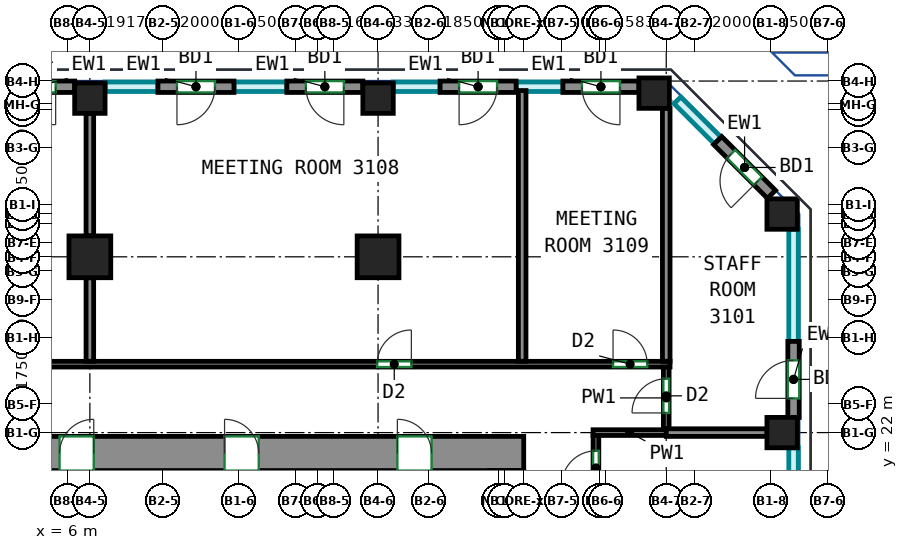
"""IFC4 building model, lengths in metres.
Left out: names, types, materials, properties, quantities, classifications, styles, units other than length and angle.
Written with IfcOpenShell. Run it as: python <this file> out.ifc"""

import sys

from ifc_helpers import new_model, si_unit, direction, frame, frame_2d, origin, origin_2d, place, context, subcontext, project, spatial, rectangle, extrude, source, transform, mapped, element, fill, save


model = new_model("IFC4")
c1 = context("Model", 3, precision=1e-05, world=origin(), true_north=direction((0.0, 1.0)))
c2 = subcontext(c1, "Body", "Model", "MODEL_VIEW")
j1 = project(units=[si_unit("LENGTHUNIT", "METRE"), si_unit("PLANEANGLEUNIT", "RADIAN")], contexts=[c1])
p1 = place(None, origin())
s1 = spatial("IfcSite", under=j1, at=p1, CompositionType="ELEMENT")
p2 = place(p1, origin())
s2 = spatial("IfcBuilding", under=s1, at=p2, CompositionType="ELEMENT")
p3 = place(p2, frame((0.0, 0.0, 138.5)))
s3 = spatial("IfcBuildingStorey", under=s2, at=p3, CompositionType="ELEMENT", Elevation=138.5)
m1 = source(origin(), c2, "Body", "SweptSolid", [
    extrude(rectangle(XDim=1.1, YDim=1.1, at=origin_2d()), origin(), (0.0, 0.0, 1.0), 5.12),
])
p4 = place(p3, frame((6.583, 26.625, 0.0), z_axis=(0.0, 0.0, 1.0), x_axis=(1.0, 0.0, 0.0)))
e1 = element("IfcColumn", 1, at=p4, inside=s3, PredefinedType="COLUMN", context=c2, shape_type="MappedRepresentation", body=[
    mapped(m1, transform((0.0, 0.0, 0.0))),
])
m2 = source(origin(), c2, "Body", "SweptSolid", [
    extrude(rectangle(XDim=0.8, YDim=0.8, at=origin_2d()), origin(), (0.0, 0.0, 1.0), 5.12),
])
p5 = place(p3, frame((6.583, 30.8, 0.0), z_axis=(0.0, 0.0, 1.0), x_axis=(1.0, 0.0, 0.0)))
e2 = element("IfcColumn", 2, at=p5, inside=s3, PredefinedType="COLUMN", context=c2, shape_type="MappedRepresentation", body=[
    mapped(m2, transform((0.0, 0.0, 0.0))),
])
p6 = place(p3, frame((14.167, 26.625, 0.0), z_axis=(0.0, 0.0, 1.0), x_axis=(1.0, 0.0, 0.0)))
e3 = element("IfcColumn", 3, at=p6, inside=s3, PredefinedType="COLUMN", context=c2, shape_type="MappedRepresentation", body=[
    mapped(m1, transform((0.0, 0.0, 0.0))),
])
for number, where, z_axis, x_axis in (
    (4, (14.167, 30.8, 0.0), (0.0, 0.0, 1.0), (1.0, 0.0, 0.0)),
    (5, (21.432, 30.932, 0.0), (0.0, 0.0, 1.0), (1.0, 0.0, 0.0)),
    (6, (24.8, 22.0, 0.0), (0.0, 0.0, 1.0), (1.0, 0.0, 0.0)),
    (7, (24.8, 27.75, 0.0), (0.0, 0.0, 1.0), (1.0, 0.0, 0.0)),
):
    element("IfcColumn", number, at=place(p3, frame(where, z_axis=z_axis, x_axis=x_axis)), inside=s3, PredefinedType="COLUMN", context=c2, shape_type="MappedRepresentation", body=[
        mapped(m2, transform((0.0, 0.0, 0.0))),
    ])
m3 = source(origin(), c2, "Body", "SweptSolid", [
    extrude(rectangle(XDim=33.9, YDim=0.9, at=frame_2d((16.95, 0.0))), origin(), (0.0, 0.0, 1.0), 5.12),
])
p7 = place(p3, frame((-15.9, 21.45, 0.0), z_axis=(0.0, 0.0, 1.0), x_axis=(1.0, 0.0, 0.0)))
e8 = element("IfcWall", 8, at=p7, inside=s3, PredefinedType="SHEAR", context=c2, shape_type="MappedRepresentation", body=[
    mapped(m3, transform((0.0, 0.0, 0.0))),
])
p8 = place(p7, frame((7.12, 0.0, 0.0)))
e9 = element("IfcOpeningElement", 9, at=p8, cuts=e8, PredefinedType="OPENING", context=c2, shape_type="SweptSolid", body=[
    extrude(rectangle(XDim=0.9, YDim=2.1, at=frame_2d((0.45, 1.05))), frame((0.0, 0.46, 0.0), z_axis=(0.0, -1.0, 0.0), x_axis=(1.0, 0.0, 0.0)), (0.0, 0.0, 1.0), 0.92),
])
p9 = place(p7, frame((12.427, 0.0, 0.0)))
e10 = element("IfcOpeningElement", 10, at=p9, cuts=e8, PredefinedType="OPENING", context=c2, shape_type="SweptSolid", body=[
    extrude(rectangle(XDim=0.9, YDim=2.1, at=frame_2d((0.45, 1.05))), frame((0.0, 0.46, 0.0), z_axis=(0.0, -1.0, 0.0), x_axis=(1.0, 0.0, 0.0)), (0.0, 0.0, 1.0), 0.92),
])
p10 = place(p7, frame((17.465, 0.0, 0.0)))
e11 = element("IfcOpeningElement", 11, at=p10, cuts=e8, PredefinedType="OPENING", context=c2, shape_type="SweptSolid", body=[
    extrude(rectangle(XDim=0.9, YDim=2.1, at=frame_2d((0.45, 1.05))), frame((0.0, 0.46, 0.0), z_axis=(0.0, -1.0, 0.0), x_axis=(1.0, 0.0, 0.0)), (0.0, 0.0, 1.0), 0.92),
])
p11 = place(p7, frame((21.686, 0.0, 0.0)))
e12 = element("IfcOpeningElement", 12, at=p11, cuts=e8, PredefinedType="OPENING", context=c2, shape_type="SweptSolid", body=[
    extrude(rectangle(XDim=0.9, YDim=2.1, at=frame_2d((0.45, 1.05))), frame((0.0, 0.46, 0.0), z_axis=(0.0, -1.0, 0.0), x_axis=(1.0, 0.0, 0.0)), (0.0, 0.0, 1.0), 0.92),
])
p12 = place(p7, frame((26.027, 0.0, 0.0)))
e13 = element("IfcOpeningElement", 13, at=p12, cuts=e8, PredefinedType="OPENING", context=c2, shape_type="SweptSolid", body=[
    extrude(rectangle(XDim=0.9, YDim=2.1, at=frame_2d((0.45, 1.05))), frame((0.0, 0.46, 0.0), z_axis=(0.0, -1.0, 0.0), x_axis=(1.0, 0.0, 0.0)), (0.0, 0.0, 1.0), 0.92),
])
p13 = place(p7, frame((2.425, 0.0, 0.0)))
e14 = element("IfcOpeningElement", 14, at=p13, cuts=e8, PredefinedType="OPENING", context=c2, shape_type="SweptSolid", body=[
    extrude(rectangle(XDim=0.9, YDim=2.1, at=frame_2d((0.45, 1.05))), frame((0.0, 0.46, 0.0), z_axis=(0.0, -1.0, 0.0), x_axis=(1.0, 0.0, 0.0)), (0.0, 0.0, 1.0), 0.92),
])
p14 = place(p7, frame((30.575, 0.0, 0.0)))
e15 = element("IfcOpeningElement", 15, at=p14, cuts=e8, PredefinedType="OPENING", context=c2, shape_type="SweptSolid", body=[
    extrude(rectangle(XDim=0.9, YDim=2.1, at=frame_2d((0.45, 1.05))), frame((0.0, 0.46, 0.0), z_axis=(0.0, -1.0, 0.0), x_axis=(1.0, 0.0, 0.0)), (0.0, 0.0, 1.0), 0.92),
])
m4 = source(origin(), c2, "Body", "SweptSolid", [
    extrude(rectangle(XDim=2.0, YDim=0.3, at=frame_2d((1.0, 0.0))), origin(), (0.0, 0.0, 1.0), 5.12),
])
p15 = place(p3, frame((25.1, 22.4, 0.0), z_axis=(0.0, 0.0, 1.0), x_axis=(0.0, 1.0, 0.0)))
e16 = element("IfcWall", 16, at=p15, inside=s3, PredefinedType="SOLIDWALL", context=c2, shape_type="MappedRepresentation", body=[
    mapped(m4, transform((0.0, 0.0, 0.0))),
])
p16 = place(p15, frame((0.5, 0.0, 0.0)))
e17 = element("IfcOpeningElement", 17, at=p16, cuts=e16, PredefinedType="OPENING", context=c2, shape_type="SweptSolid", body=[
    extrude(rectangle(XDim=1.0, YDim=2.1, at=frame_2d((0.5, 1.05))), frame((0.0, 0.16, 0.0), z_axis=(0.0, -1.0, 0.0), x_axis=(1.0, 0.0, 0.0)), (0.0, 0.0, 1.0), 0.32),
])
p17 = place(p3, frame((24.519, 28.269, 0.0), z_axis=(0.0, 0.0, 1.0), x_axis=(-0.707045742145, 0.70716781496, 0.0)))
e18 = element("IfcWall", 18, at=p17, inside=s3, PredefinedType="SOLIDWALL", context=c2, shape_type="MappedRepresentation", body=[
    mapped(m4, transform((0.0, 0.0, 0.0))),
])
p18 = place(p17, frame((0.5, 0.0, 0.0)))
e19 = element("IfcOpeningElement", 19, at=p18, cuts=e18, PredefinedType="OPENING", context=c2, shape_type="SweptSolid", body=[
    extrude(rectangle(XDim=1.0, YDim=2.1, at=frame_2d((0.5, 1.05))), frame((0.0, 0.16, 0.0), z_axis=(0.0, -1.0, 0.0), x_axis=(1.0, 0.0, 0.0)), (0.0, 0.0, 1.0), 0.32),
])
p19 = place(p3, frame((21.032, 31.1, 0.0), z_axis=(0.0, 0.0, 1.0), x_axis=(-1.0, 0.0, 0.0)))
e20 = element("IfcWall", 20, at=p19, inside=s3, PredefinedType="SOLIDWALL", context=c2, shape_type="MappedRepresentation", body=[
    mapped(m4, transform((0.0, 0.0, 0.0))),
])
p20 = place(p19, frame((0.5, 0.0, 0.0)))
e21 = element("IfcOpeningElement", 21, at=p20, cuts=e20, PredefinedType="OPENING", context=c2, shape_type="SweptSolid", body=[
    extrude(rectangle(XDim=1.0, YDim=2.1, at=frame_2d((0.5, 1.05))), frame((0.0, 0.16, 0.0), z_axis=(0.0, -1.0, 0.0), x_axis=(1.0, 0.0, 0.0)), (0.0, 0.0, 1.0), 0.32),
])
p21 = place(p3, frame((17.799, 31.1, 0.0), z_axis=(0.0, 0.0, 1.0), x_axis=(-1.0, 0.0, 0.0)))
e22 = element("IfcWall", 22, at=p21, inside=s3, PredefinedType="SOLIDWALL", context=c2, shape_type="MappedRepresentation", body=[
    mapped(m4, transform((0.0, 0.0, 0.0))),
])
p22 = place(p21, frame((0.5, 0.0, 0.0)))
e23 = element("IfcOpeningElement", 23, at=p22, cuts=e22, PredefinedType="OPENING", context=c2, shape_type="SweptSolid", body=[
    extrude(rectangle(XDim=1.0, YDim=2.1, at=frame_2d((0.5, 1.05))), frame((0.0, 0.16, 0.0), z_axis=(0.0, -1.0, 0.0), x_axis=(1.0, 0.0, 0.0)), (0.0, 0.0, 1.0), 0.32),
])
p23 = place(p3, frame((13.767, 31.1, 0.0), z_axis=(0.0, 0.0, 1.0), x_axis=(-1.0, 0.0, 0.0)))
e24 = element("IfcWall", 24, at=p23, inside=s3, PredefinedType="SOLIDWALL", context=c2, shape_type="MappedRepresentation", body=[
    mapped(m4, transform((0.0, 0.0, 0.0))),
])
p24 = place(p23, frame((0.5, 0.0, 0.0)))
e25 = element("IfcOpeningElement", 25, at=p24, cuts=e24, PredefinedType="OPENING", context=c2, shape_type="SweptSolid", body=[
    extrude(rectangle(XDim=1.0, YDim=2.1, at=frame_2d((0.5, 1.05))), frame((0.0, 0.16, 0.0), z_axis=(0.0, -1.0, 0.0), x_axis=(1.0, 0.0, 0.0)), (0.0, 0.0, 1.0), 0.32),
])
p25 = place(p3, frame((10.375, 31.1, 0.0), z_axis=(0.0, 0.0, 1.0), x_axis=(-1.0, 0.0, 0.0)))
e26 = element("IfcWall", 26, at=p25, inside=s3, PredefinedType="SOLIDWALL", context=c2, shape_type="MappedRepresentation", body=[
    mapped(m4, transform((0.0, 0.0, 0.0))),
])
p26 = place(p25, frame((0.5, 0.0, 0.0)))
e27 = element("IfcOpeningElement", 27, at=p26, cuts=e26, PredefinedType="OPENING", context=c2, shape_type="SweptSolid", body=[
    extrude(rectangle(XDim=1.0, YDim=2.1, at=frame_2d((0.5, 1.05))), frame((0.0, 0.16, 0.0), z_axis=(0.0, -1.0, 0.0), x_axis=(1.0, 0.0, 0.0)), (0.0, 0.0, 1.0), 0.32),
])
p27 = place(p3, frame((6.183, 31.1, 0.0), z_axis=(0.0, 0.0, 1.0), x_axis=(-1.0, 0.0, 0.0)))
e28 = element("IfcWall", 28, at=p27, inside=s3, PredefinedType="SOLIDWALL", context=c2, shape_type="MappedRepresentation", body=[
    mapped(m4, transform((0.0, 0.0, 0.0))),
])
p28 = place(p27, frame((0.5, 0.0, 0.0)))
e29 = element("IfcOpeningElement", 29, at=p28, cuts=e28, PredefinedType="OPENING", context=c2, shape_type="SweptSolid", body=[
    extrude(rectangle(XDim=1.0, YDim=2.1, at=frame_2d((0.5, 1.05))), frame((0.0, 0.16, 0.0), z_axis=(0.0, -1.0, 0.0), x_axis=(1.0, 0.0, 0.0)), (0.0, 0.0, 1.0), 0.32),
])
p29 = place(p3, frame((-20.059, 23.8, 0.0), z_axis=(0.0, 0.0, 1.0), x_axis=(1.0, 0.0, 0.0)))
e30 = element("IfcWall", 30, at=p29, inside=s3, PredefinedType="PARTITIONING", context=c2, shape_type="SweptSolid", body=[
    extrude(rectangle(XDim=41.909, YDim=0.15, at=frame_2d((20.955, 0.0))), origin(), (0.0, 0.0, 1.0), 5.12),
])
p30 = place(p29, frame((6.453, 0.0, 0.0)))
e31 = element("IfcOpeningElement", 31, at=p30, cuts=e30, PredefinedType="OPENING", context=c2, shape_type="SweptSolid", body=[
    extrude(rectangle(XDim=0.9, YDim=2.1, at=frame_2d((0.45, 1.05))), frame((0.0, 0.085, 0.0), z_axis=(0.0, -1.0, 0.0), x_axis=(1.0, 0.0, 0.0)), (0.0, 0.0, 1.0), 0.17),
])
p31 = place(p29, frame((14.383, 0.0, 0.0)))
e32 = element("IfcOpeningElement", 32, at=p31, cuts=e30, PredefinedType="OPENING", context=c2, shape_type="SweptSolid", body=[
    extrude(rectangle(XDim=0.9, YDim=2.1, at=frame_2d((0.45, 1.05))), frame((0.0, 0.085, 0.0), z_axis=(0.0, -1.0, 0.0), x_axis=(1.0, 0.0, 0.0)), (0.0, 0.0, 1.0), 0.17),
])
p32 = place(p29, frame((34.202, 0.0, 0.0)))
e33 = element("IfcOpeningElement", 33, at=p32, cuts=e30, PredefinedType="OPENING", context=c2, shape_type="SweptSolid", body=[
    extrude(rectangle(XDim=0.9, YDim=2.1, at=frame_2d((0.45, 1.05))), frame((0.0, 0.085, 0.0), z_axis=(0.0, -1.0, 0.0), x_axis=(1.0, 0.0, 0.0)), (0.0, 0.0, 1.0), 0.17),
])
p33 = place(p29, frame((40.409, 0.0, 0.0)))
e34 = element("IfcOpeningElement", 34, at=p33, cuts=e30, PredefinedType="OPENING", context=c2, shape_type="SweptSolid", body=[
    extrude(rectangle(XDim=0.9, YDim=2.1, at=frame_2d((0.45, 1.05))), frame((0.0, 0.085, 0.0), z_axis=(0.0, -1.0, 0.0), x_axis=(1.0, 0.0, 0.0)), (0.0, 0.0, 1.0), 0.17),
])
p34 = place(p3, frame((21.75, 22.1, 0.0), z_axis=(0.0, 0.0, 1.0), x_axis=(0.0, 1.0, 0.0)))
e35 = element("IfcWall", 35, at=p34, inside=s3, PredefinedType="PARTITIONING", context=c2, shape_type="SweptSolid", body=[
    extrude(rectangle(XDim=1.625, YDim=0.15, at=frame_2d((0.812, 0.0))), origin(), (0.0, 0.0, 1.0), 5.12),
])
p35 = place(p34, frame((0.417, 0.0, 0.0)))
e36 = element("IfcOpeningElement", 36, at=p35, cuts=e35, PredefinedType="OPENING", context=c2, shape_type="SweptSolid", body=[
    extrude(rectangle(XDim=0.9, YDim=2.1, at=frame_2d((0.45, 1.05))), frame((0.0, 0.085, 0.0), z_axis=(0.0, -1.0, 0.0), x_axis=(1.0, 0.0, 0.0)), (0.0, 0.0, 1.0), 0.17),
])
p36 = place(p3, frame((19.825, 22.0, 0.0), z_axis=(0.0, 0.0, 1.0), x_axis=(1.0, 0.0, 0.0)))
e37 = element("IfcWall", 37, at=p36, inside=s3, PredefinedType="PARTITIONING", context=c2, shape_type="SweptSolid", body=[
    extrude(rectangle(XDim=1.925, YDim=0.15, at=frame_2d((0.962, 0.0))), origin(), (0.0, 0.0, 1.0), 5.12),
])
p37 = place(p3, frame((19.9, 17.75, 0.0), z_axis=(0.0, 0.0, 1.0), x_axis=(0.0, 1.0, 0.0)))
e38 = element("IfcWall", 38, at=p37, inside=s3, PredefinedType="PARTITIONING", context=c2, shape_type="SweptSolid", body=[
    extrude(rectangle(XDim=4.175, YDim=0.15, at=frame_2d((2.087, 0.0))), origin(), (0.0, 0.0, 1.0), 5.12),
])
p38 = place(p37, frame((2.87, 0.0, 0.0)))
e39 = element("IfcOpeningElement", 39, at=p38, cuts=e38, PredefinedType="OPENING", context=c2, shape_type="SweptSolid", body=[
    extrude(rectangle(XDim=0.9, YDim=2.1, at=frame_2d((0.45, 1.05))), frame((0.0, 0.085, 0.0), z_axis=(0.0, -1.0, 0.0), x_axis=(1.0, 0.0, 0.0)), (0.0, 0.0, 1.0), 0.17),
])
p39 = place(p3, frame((6.583, 27.175, 0.0), z_axis=(0.0, 0.0, 1.0), x_axis=(0.0, 1.0, 0.0)))
e40 = element("IfcWall", 40, at=p39, inside=s3, PredefinedType="PARTITIONING", context=c2, shape_type="SweptSolid", body=[
    extrude(rectangle(XDim=3.225, YDim=0.2, at=frame_2d((1.612, 0.0))), origin(), (0.0, 0.0, 1.0), 5.12),
])
p40 = place(p3, frame((6.583, 23.877, 0.0), z_axis=(0.0, 0.0, 1.0), x_axis=(0.0, 1.0, 0.0)))
e41 = element("IfcWall", 41, at=p40, inside=s3, PredefinedType="PARTITIONING", context=c2, shape_type="SweptSolid", body=[
    extrude(rectangle(XDim=2.198, YDim=0.2, at=frame_2d((1.099, 0.0))), origin(), (0.0, 0.0, 1.0), 5.12),
])
p41 = place(p3, frame((17.959, 23.877, 0.0), z_axis=(0.0, 0.0, 1.0), x_axis=(0.0, 1.0, 0.0)))
e42 = element("IfcWall", 42, at=p41, inside=s3, PredefinedType="PARTITIONING", context=c2, shape_type="SweptSolid", body=[
    extrude(rectangle(XDim=7.123, YDim=0.2, at=frame_2d((3.562, 0.0))), origin(), (0.0, 0.0, 1.0), 5.12),
])
p42 = place(p3, frame((21.75, 23.877, 0.0), z_axis=(0.0, 0.0, 1.0), x_axis=(0.0, 1.0, 0.0)))
e43 = element("IfcWall", 43, at=p42, inside=s3, PredefinedType="PARTITIONING", context=c2, shape_type="SweptSolid", body=[
    extrude(rectangle(XDim=6.655, YDim=0.2, at=frame_2d((3.328, 0.0))), origin(), (0.0, 0.0, 1.0), 5.12),
])
p43 = place(p3, frame((21.752, 22.0, 0.0), z_axis=(0.0, 0.0, 1.0), x_axis=(1.0, 0.0, 0.0)))
e44 = element("IfcWall", 44, at=p43, inside=s3, PredefinedType="PARTITIONING", context=c2, shape_type="SweptSolid", body=[
    extrude(rectangle(XDim=2.648, YDim=0.2, at=frame_2d((1.324, 0.0))), origin(), (0.0, 0.0, 1.0), 5.12),
])
p44 = place(p16, origin())
e45 = element("IfcDoor", 45, at=p44, inside=s3, OperationType="SINGLE_SWING_LEFT", PredefinedType="DOOR", context=c2, shape_type="SweptSolid", body=[
    extrude(rectangle(XDim=1.0, YDim=2.1, at=frame_2d((0.5, 1.05))), frame((0.0, 0.025, 0.0), z_axis=(0.0, -1.0, 0.0), x_axis=(1.0, 0.0, 0.0)), (0.0, 0.0, 1.0), 0.05),
])
fill(e17, e45)
p45 = place(p18, origin())
e46 = element("IfcDoor", 46, at=p45, inside=s3, OperationType="SINGLE_SWING_LEFT", PredefinedType="DOOR", context=c2, shape_type="SweptSolid", body=[
    extrude(rectangle(XDim=1.0, YDim=2.1, at=frame_2d((0.5, 1.05))), frame((0.0, 0.025, 0.0), z_axis=(0.0, -1.0, 0.0), x_axis=(1.0, 0.0, 0.0)), (0.0, 0.0, 1.0), 0.05),
])
fill(e19, e46)
p46 = place(p20, origin())
e47 = element("IfcDoor", 47, at=p46, inside=s3, OperationType="SINGLE_SWING_LEFT", PredefinedType="DOOR", context=c2, shape_type="SweptSolid", body=[
    extrude(rectangle(XDim=1.0, YDim=2.1, at=frame_2d((0.5, 1.05))), frame((0.0, 0.025, 0.0), z_axis=(0.0, -1.0, 0.0), x_axis=(1.0, 0.0, 0.0)), (0.0, 0.0, 1.0), 0.05),
])
fill(e21, e47)
p47 = place(p22, origin())
e48 = element("IfcDoor", 48, at=p47, inside=s3, OperationType="SINGLE_SWING_RIGHT", PredefinedType="DOOR", context=c2, shape_type="SweptSolid", body=[
    extrude(rectangle(XDim=1.0, YDim=2.1, at=frame_2d((0.5, 1.05))), frame((0.0, 0.025, 0.0), z_axis=(0.0, -1.0, 0.0), x_axis=(1.0, 0.0, 0.0)), (0.0, 0.0, 1.0), 0.05),
])
fill(e23, e48)
p48 = place(p24, origin())
e49 = element("IfcDoor", 49, at=p48, inside=s3, OperationType="SINGLE_SWING_LEFT", PredefinedType="DOOR", context=c2, shape_type="SweptSolid", body=[
    extrude(rectangle(XDim=1.0, YDim=2.1, at=frame_2d((0.5, 1.05))), frame((0.0, 0.025, 0.0), z_axis=(0.0, -1.0, 0.0), x_axis=(1.0, 0.0, 0.0)), (0.0, 0.0, 1.0), 0.05),
])
fill(e25, e49)
p49 = place(p26, origin())
e50 = element("IfcDoor", 50, at=p49, inside=s3, OperationType="SINGLE_SWING_RIGHT", PredefinedType="DOOR", context=c2, shape_type="SweptSolid", body=[
    extrude(rectangle(XDim=1.0, YDim=2.1, at=frame_2d((0.5, 1.05))), frame((0.0, 0.025, 0.0), z_axis=(0.0, -1.0, 0.0), x_axis=(1.0, 0.0, 0.0)), (0.0, 0.0, 1.0), 0.05),
])
fill(e27, e50)
p50 = place(p28, origin())
e51 = element("IfcDoor", 51, at=p50, inside=s3, OperationType="SINGLE_SWING_LEFT", PredefinedType="DOOR", context=c2, shape_type="SweptSolid", body=[
    extrude(rectangle(XDim=1.0, YDim=2.1, at=frame_2d((0.5, 1.05))), frame((0.0, 0.025, 0.0), z_axis=(0.0, -1.0, 0.0), x_axis=(1.0, 0.0, 0.0)), (0.0, 0.0, 1.0), 0.05),
])
fill(e29, e51)
p51 = place(p11, origin())
e52 = element("IfcDoor", 52, at=p51, inside=s3, OperationType="SINGLE_SWING_RIGHT", PredefinedType="DOOR", context=c2, shape_type="SweptSolid", body=[
    extrude(rectangle(XDim=0.9, YDim=2.1, at=frame_2d((0.45, 1.05))), frame((0.0, -0.305, 0.0), z_axis=(0.0, -1.0, 0.0), x_axis=(1.0, 0.0, 0.0)), (0.0, 0.0, 1.0), 0.05),
])
fill(e12, e52)
p52 = place(p12, origin())
e53 = element("IfcDoor", 53, at=p52, inside=s3, OperationType="SINGLE_SWING_LEFT", PredefinedType="DOOR", context=c2, shape_type="SweptSolid", body=[
    extrude(rectangle(XDim=0.9, YDim=2.1, at=frame_2d((0.45, 1.05))), frame((0.0, -0.305, 0.0), z_axis=(0.0, -1.0, 0.0), x_axis=(1.0, 0.0, 0.0)), (0.0, 0.0, 1.0), 0.05),
])
fill(e13, e53)
p53 = place(p14, origin())
e54 = element("IfcDoor", 54, at=p53, inside=s3, OperationType="SINGLE_SWING_LEFT", PredefinedType="DOOR", context=c2, shape_type="SweptSolid", body=[
    extrude(rectangle(XDim=0.9, YDim=2.1, at=frame_2d((0.45, 1.05))), frame((0.0, -0.305, 0.0), z_axis=(0.0, -1.0, 0.0), x_axis=(1.0, 0.0, 0.0)), (0.0, 0.0, 1.0), 0.05),
])
fill(e15, e54)
p54 = place(p38, origin())
e55 = element("IfcDoor", 55, at=p54, inside=s3, OperationType="SINGLE_SWING_LEFT", PredefinedType="DOOR", context=c2, shape_type="SweptSolid", body=[
    extrude(rectangle(XDim=0.9, YDim=2.1, at=frame_2d((0.45, 1.05))), frame((0.0, 0.025, 0.0), z_axis=(0.0, -1.0, 0.0), x_axis=(1.0, 0.0, 0.0)), (0.0, 0.0, 1.0), 0.05),
])
fill(e39, e55)
p55 = place(p35, origin())
e56 = element("IfcDoor", 56, at=p55, inside=s3, OperationType="SINGLE_SWING_LEFT", PredefinedType="DOOR", context=c2, shape_type="SweptSolid", body=[
    extrude(rectangle(XDim=0.9, YDim=2.1, at=frame_2d((0.45, 1.05))), frame((0.0, 0.025, 0.0), z_axis=(0.0, -1.0, 0.0), x_axis=(1.0, 0.0, 0.0)), (0.0, 0.0, 1.0), 0.05),
])
fill(e36, e56)
p56 = place(p32, origin())
e57 = element("IfcDoor", 57, at=p56, inside=s3, OperationType="SINGLE_SWING_RIGHT", PredefinedType="DOOR", context=c2, shape_type="SweptSolid", body=[
    extrude(rectangle(XDim=0.9, YDim=2.1, at=frame_2d((0.45, 1.05))), frame((0.0, 0.025, 0.0), z_axis=(0.0, -1.0, 0.0), x_axis=(1.0, 0.0, 0.0)), (0.0, 0.0, 1.0), 0.05),
])
fill(e33, e57)
p57 = place(p33, origin())
e58 = element("IfcDoor", 58, at=p57, inside=s3, OperationType="SINGLE_SWING_LEFT", PredefinedType="DOOR", context=c2, shape_type="SweptSolid", body=[
    extrude(rectangle(XDim=0.9, YDim=2.1, at=frame_2d((0.45, 1.05))), frame((0.0, 0.025, 0.0), z_axis=(0.0, -1.0, 0.0), x_axis=(1.0, 0.0, 0.0)), (0.0, 0.0, 1.0), 0.05),
])
fill(e34, e58)
save(model, sys.argv[1])
